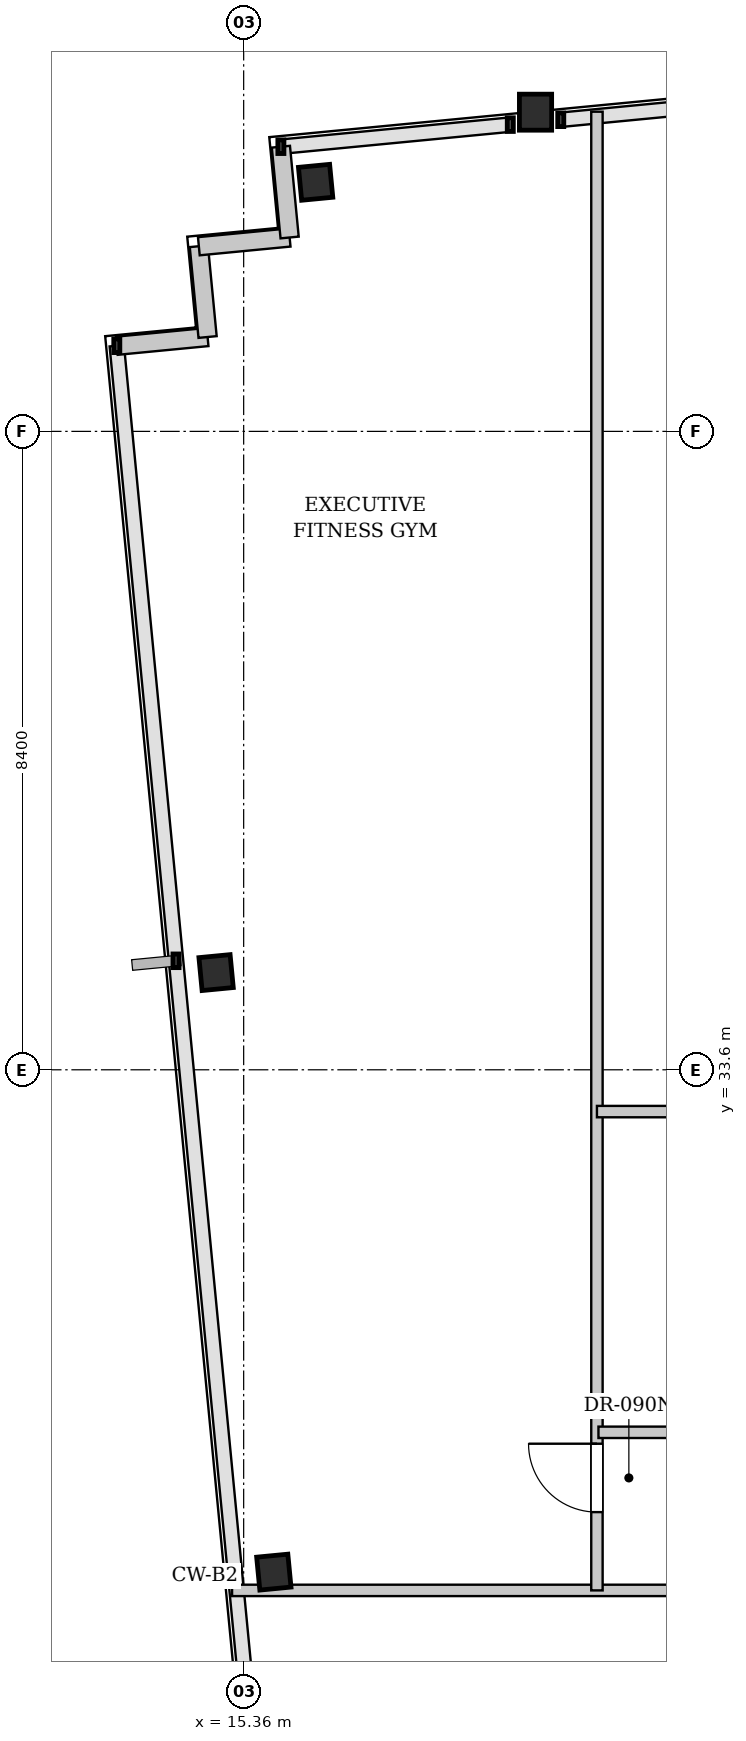
"""IFC4 building model, lengths in metres.
Left out: names, types, materials, properties, quantities, classifications, styles, units other than length and angle.
Written with IfcOpenShell. Run it as: python <this file> out.ifc"""

import sys

from ifc_helpers import new_model, si_unit, direction, frame, frame_2d, origin, origin_2d, place, context, subcontext, project, spatial, rectangle, i_section, extrude, element, fill, save


model = new_model("IFC4")
c1 = context("Model", 3, precision=1e-05, world=origin(), true_north=direction((0.0, 1.0)))
c2 = subcontext(c1, "Body", "Model", "MODEL_VIEW")
j1 = project(units=[si_unit("LENGTHUNIT", "METRE"), si_unit("PLANEANGLEUNIT", "RADIAN")], contexts=[c1])
p1 = place(None, origin())
s1 = spatial("IfcSite", under=j1, at=p1, CompositionType="ELEMENT")
p2 = place(p1, origin())
s2 = spatial("IfcBuilding", under=s1, at=p2, CompositionType="ELEMENT")
p3 = place(p2, frame((0.0, 0.0, 106.7)))
s3 = spatial("IfcBuildingStorey", under=s2, at=p3, CompositionType="ELEMENT", Elevation=106.7)
p4 = place(p3, frame((19.2, 46.2, 0.0), z_axis=(0.0, 0.0, 1.0), x_axis=(1.0, 0.0, 0.0)))
e1 = element("IfcColumn", 1, at=p4, inside=s3, PredefinedType="COLUMN", context=c2, shape_type="SweptSolid", body=[
    extrude(i_section(OverallWidth=0.424, OverallDepth=0.474, WebThickness=0.047, FlangeThickness=0.077, FilletRadius=0.015, at=origin_2d()), origin(), (0.0, 0.0, 1.0), 3.4),
])
for number, where, z_axis, x_axis in (
    (2, (16.307, 45.277, 0.0), (0.0, 0.0, 1.0), (0.995, 0.096, 0.0)),
    (3, (15.757, 26.99, 0.0), (0.0, 0.0, 1.0), (0.995, 0.096, 0.0)),
    (4, (14.997, 34.879, 0.0), (0.0, 0.0, 1.0), (0.995, 0.096, 0.0)),
):
    element("IfcColumn", number, at=place(p3, frame(where, z_axis=z_axis, x_axis=x_axis)), inside=s3, PredefinedType="COLUMN", context=c2, shape_type="SweptSolid", body=[
        extrude(i_section(OverallWidth=0.412, OverallDepth=0.435, WebThickness=0.036, FlangeThickness=0.058, FilletRadius=0.015, at=origin_2d()), origin(), (0.0, 0.0, 1.0), 3.4),
    ])
for number, where, z_axis, x_axis in (
    (5, (13.691, 43.127, 0.0), (0.0, 0.0, 1.0), (0.995, 0.096, 0.0)),
    (6, (14.885, 43.242, 0.0), (0.0, 0.0, 1.0), (-0.096, 0.995, 0.0)),
):
    element("IfcWall", number, at=place(p3, frame(where, z_axis=z_axis, x_axis=x_axis)), inside=s3, PredefinedType="SOLIDWALL", context=c2, shape_type="SweptSolid", body=[
        extrude(rectangle(XDim=1.2, YDim=0.24, at=frame_2d((0.6, 0.0))), origin(), (0.0, 0.0, 1.0), 3.18),
    ])
for number, where, z_axis, x_axis in (
    (7, (14.771, 44.436, 0.0), (0.0, 0.0, 1.0), (0.995, 0.096, 0.0)),
    (8, (15.965, 44.551, 0.0), (0.0, 0.0, 1.0), (-0.096, 0.995, 0.0)),
):
    element("IfcWall", number, at=place(p3, frame(where, z_axis=z_axis, x_axis=x_axis)), inside=s3, PredefinedType="SOLIDWALL", context=c2, shape_type="SweptSolid", body=[
        extrude(rectangle(XDim=1.2, YDim=0.24, at=frame_2d((0.6, 0.0))), origin(), (0.0, 0.0, 1.0), 3.18),
    ])
p5 = place(p3, frame((15.208, 26.75, 0.0), z_axis=(0.0, 0.0, 1.0), x_axis=(1.0, 0.0, 0.0)))
e9 = element("IfcWall", 9, at=p5, inside=s3, PredefinedType="PARTITIONING", context=c2, shape_type="SweptSolid", body=[
    extrude(rectangle(XDim=61.222, YDim=0.15, at=frame_2d((30.611, 0.0))), origin(), (0.0, 0.0, 1.0), 2.525),
])
p6 = place(p5, frame((9.474, 0.0, 0.0)))
e10 = element("IfcOpeningElement", 10, at=p6, cuts=e9, PredefinedType="OPENING", context=c2, shape_type="SweptSolid", body=[
    extrude(rectangle(XDim=1.0, YDim=2.15, at=frame_2d((0.5, 1.075))), frame((0.0, 0.085, 0.0), z_axis=(0.0, -1.0, 0.0), x_axis=(1.0, 0.0, 0.0)), (0.0, 0.0, 1.0), 0.17),
])
p7 = place(p5, frame((17.351, 0.0, 0.0)))
e11 = element("IfcOpeningElement", 11, at=p7, cuts=e9, PredefinedType="OPENING", context=c2, shape_type="SweptSolid", body=[
    extrude(rectangle(XDim=1.0, YDim=2.15, at=frame_2d((0.5, 1.075))), frame((0.0, 0.085, 0.0), z_axis=(0.0, -1.0, 0.0), x_axis=(1.0, 0.0, 0.0)), (0.0, 0.0, 1.0), 0.17),
])
p8 = place(p5, frame((24.736, 0.0, 0.0)))
e12 = element("IfcOpeningElement", 12, at=p8, cuts=e9, PredefinedType="OPENING", context=c2, shape_type="SweptSolid", body=[
    extrude(rectangle(XDim=1.0, YDim=2.15, at=frame_2d((0.5, 1.075))), frame((0.0, 0.085, 0.0), z_axis=(0.0, -1.0, 0.0), x_axis=(1.0, 0.0, 0.0)), (0.0, 0.0, 1.0), 0.17),
])
p9 = place(p5, frame((32.429, 0.0, 0.0)))
e13 = element("IfcOpeningElement", 13, at=p9, cuts=e9, PredefinedType="OPENING", context=c2, shape_type="SweptSolid", body=[
    extrude(rectangle(XDim=1.0, YDim=2.15, at=frame_2d((0.5, 1.075))), frame((0.0, 0.085, 0.0), z_axis=(0.0, -1.0, 0.0), x_axis=(1.0, 0.0, 0.0)), (0.0, 0.0, 1.0), 0.17),
])
p10 = place(p5, frame((35.993, 0.0, 0.0)))
e14 = element("IfcOpeningElement", 14, at=p10, cuts=e9, PredefinedType="OPENING", context=c2, shape_type="SweptSolid", body=[
    extrude(rectangle(XDim=1.0, YDim=2.15, at=frame_2d((0.5, 1.075))), frame((0.0, 0.085, 0.0), z_axis=(0.0, -1.0, 0.0), x_axis=(1.0, 0.0, 0.0)), (0.0, 0.0, 1.0), 0.17),
])
p11 = place(p5, frame((43.982, 0.0, 0.0)))
e15 = element("IfcOpeningElement", 15, at=p11, cuts=e9, PredefinedType="OPENING", context=c2, shape_type="SweptSolid", body=[
    extrude(rectangle(XDim=1.0, YDim=2.15, at=frame_2d((0.5, 1.075))), frame((0.0, 0.085, 0.0), z_axis=(0.0, -1.0, 0.0), x_axis=(1.0, 0.0, 0.0)), (0.0, 0.0, 1.0), 0.17),
])
p12 = place(p5, frame((50.267, 0.0, 0.0)))
e16 = element("IfcOpeningElement", 16, at=p12, cuts=e9, PredefinedType="OPENING", context=c2, shape_type="SweptSolid", body=[
    extrude(rectangle(XDim=1.0, YDim=2.15, at=frame_2d((0.5, 1.075))), frame((0.0, 0.085, 0.0), z_axis=(0.0, -1.0, 0.0), x_axis=(1.0, 0.0, 0.0)), (0.0, 0.0, 1.0), 0.17),
])
p13 = place(p3, frame((20.008, 26.75, 0.0), z_axis=(0.0, 0.0, 1.0), x_axis=(0.0, 1.0, 0.0)))
e17 = element("IfcWall", 17, at=p13, inside=s3, PredefinedType="PARTITIONING", context=c2, shape_type="SweptSolid", body=[
    extrude(rectangle(XDim=19.456, YDim=0.15, at=frame_2d((9.728, 0.0))), origin(), (0.0, 0.0, 1.0), 3.18),
])
p14 = place(p13, frame((1.03, 0.0, 0.0)))
e18 = element("IfcOpeningElement", 18, at=p14, cuts=e17, PredefinedType="OPENING", context=c2, shape_type="SweptSolid", body=[
    extrude(rectangle(XDim=0.9, YDim=2.15, at=frame_2d((0.45, 1.075))), frame((0.0, 0.085, 0.0), z_axis=(0.0, -1.0, 0.0), x_axis=(1.0, 0.0, 0.0)), (0.0, 0.0, 1.0), 0.17),
])
p15 = place(p3, frame((20.008, 33.05, 0.0), z_axis=(0.0, 0.0, 1.0), x_axis=(1.0, 0.0, 0.0)))
e19 = element("IfcWall", 19, at=p15, inside=s3, PredefinedType="PARTITIONING", context=c2, shape_type="SweptSolid", body=[
    extrude(rectangle(XDim=6.292, YDim=0.15, at=frame_2d((3.146, 0.0))), origin(), (0.0, 0.0, 1.0), 3.18),
])
p16 = place(p3, frame((20.028, 28.83, 0.0), z_axis=(0.0, 0.0, 1.0), x_axis=(1.0, 0.0, 0.0)))
e20 = element("IfcWall", 20, at=p16, inside=s3, PredefinedType="PARTITIONING", context=c2, shape_type="SweptSolid", body=[
    extrude(rectangle(XDim=6.262, YDim=0.15, at=frame_2d((3.131, 0.0))), origin(), (0.0, 0.0, 1.0), 3.18),
])
p17 = place(p16, frame((2.681, 0.0, 0.0)))
e21 = element("IfcOpeningElement", 21, at=p17, cuts=e20, PredefinedType="OPENING", context=c2, shape_type="SweptSolid", body=[
    extrude(rectangle(XDim=0.9, YDim=2.15, at=frame_2d((0.45, 1.075))), frame((0.0, 0.085, 0.0), z_axis=(0.0, -1.0, 0.0), x_axis=(1.0, 0.0, 0.0)), (0.0, 0.0, 1.0), 0.17),
])
p18 = place(p14, origin())
e22 = element("IfcDoor", 22, at=p18, inside=s3, OperationType="SINGLE_SWING_RIGHT", PredefinedType="DOOR", context=c2, shape_type="SweptSolid", body=[
    extrude(rectangle(XDim=0.9, YDim=2.15, at=frame_2d((0.45, 1.075))), frame((0.0, 0.025, 0.0), z_axis=(0.0, -1.0, 0.0), x_axis=(1.0, 0.0, 0.0)), (0.0, 0.0, 1.0), 0.05),
])
fill(e18, e22)
save(model, sys.argv[1])
